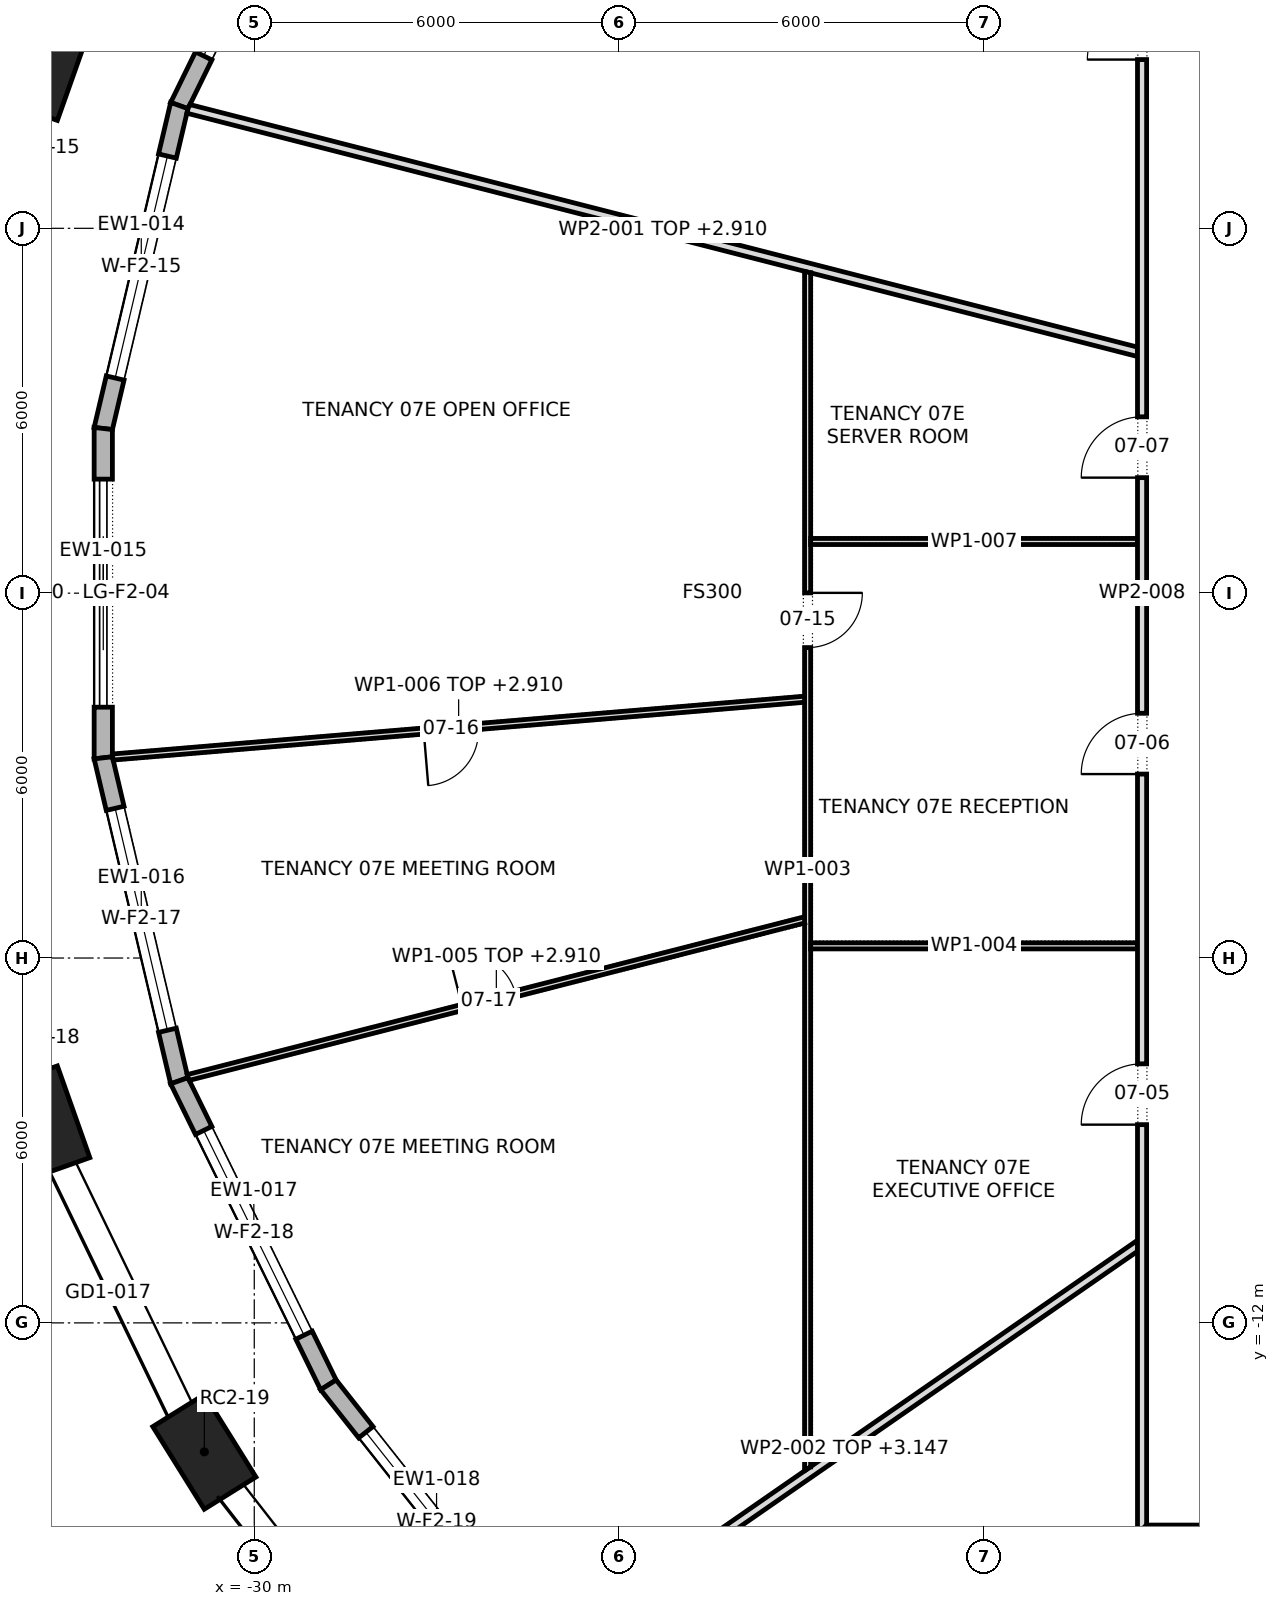
"""IFC4 building model, lengths in metres.
Left out: names, types, materials, properties, quantities, classifications, styles, units other than length and angle.
Written with IfcOpenShell. Run it as: python <this file> out.ifc"""

import sys

from ifc_helpers import new_model, si_unit, direction, frame, frame_2d, origin, origin_2d, place, context, subcontext, project, spatial, polyline, rectangle, outline, extrude, element, fill, save


model = new_model("IFC4")
c1 = context("Model", 3, precision=1e-05, world=origin(), true_north=direction((0.0, 1.0)))
c2 = subcontext(c1, "Body", "Model", "MODEL_VIEW")
j1 = project(units=[si_unit("LENGTHUNIT", "METRE"), si_unit("PLANEANGLEUNIT", "RADIAN")], contexts=[c1])
p1 = place(None, origin())
s1 = spatial("IfcSite", under=j1, at=p1, CompositionType="ELEMENT")
p2 = place(p1, origin())
s2 = spatial("IfcBuilding", under=s1, at=p2, CompositionType="ELEMENT")
p3 = place(p2, frame((0.0, 0.0, 112.9)))
s3 = spatial("IfcBuildingStorey", under=s2, at=p3, CompositionType="ELEMENT", Elevation=112.9)
for number, where, z_axis, x_axis in (
    (1, (-33.443, 8.695, 0.0), (0.0, 0.0, 1.0), (-0.334, -0.943, 0.0)),
    (2, (-33.443, -8.695, 0.0), (0.0, 0.0, 1.0), (0.334, -0.943, 0.0)),
    (3, (-30.821, -14.121, 0.0), (0.0, 0.0, 1.0), (0.529, -0.849, 0.0)),
):
    element("IfcColumn", number, at=place(p3, frame(where, z_axis=z_axis, x_axis=x_axis)), inside=s3, PredefinedType="COLUMN", context=c2, shape_type="SweptSolid", body=[
        extrude(rectangle(XDim=1.6, YDim=1.0, at=origin_2d()), origin(), (0.0, 0.0, 1.0), 4.2),
    ])
p4 = place(p3, frame((-28.781, 13.019, 0.0), z_axis=(0.0, 0.0, 1.0), x_axis=(-0.440238988749, -0.897880633929, 0.0)))
e4 = element("IfcWall", 4, at=p4, inside=s3, PredefinedType="STANDARD", context=c2, shape_type="SweptSolid", body=[
    extrude(outline(polyline([(-0.016, -0.15), (5.586, -0.15), (5.553, 0.15), (0.016, 0.15), (-0.016, -0.15)])), origin(), (0.0, 0.0, 1.0), 3.9),
])
p5 = place(p4, frame((0.91, 0.0, 0.6)))
e5 = element("IfcOpeningElement", 5, at=p5, cuts=e4, PredefinedType="OPENING", context=c2, shape_type="SweptSolid", body=[
    extrude(rectangle(XDim=3.75, YDim=2.85, at=frame_2d((1.875, 1.425))), frame((0.0, 0.162, 0.0), z_axis=(0.0, -1.0, 0.0), x_axis=(1.0, 0.0, 0.0)), (0.0, 0.0, 1.0), 0.324),
])
p6 = place(p3, frame((-31.233, 8.019, 0.0), z_axis=(0.0, 0.0, 1.0), x_axis=(-0.229193964616, -0.973380771632, 0.0)))
e6 = element("IfcWall", 6, at=p6, inside=s3, PredefinedType="STANDARD", context=c2, shape_type="SweptSolid", body=[
    extrude(outline(polyline([(-0.017, -0.15), (5.473, -0.15), (5.439, 0.15), (0.017, 0.15), (-0.017, -0.15)])), origin(), (0.0, 0.0, 1.0), 3.9),
])
p7 = place(p6, frame((0.853, 0.0, 0.6)))
e7 = element("IfcOpeningElement", 7, at=p7, cuts=e6, PredefinedType="OPENING", context=c2, shape_type="SweptSolid", body=[
    extrude(rectangle(XDim=3.75, YDim=2.85, at=frame_2d((1.875, 1.425))), frame((0.0, 0.162, 0.0), z_axis=(0.0, -1.0, 0.0), x_axis=(1.0, 0.0, 0.0)), (0.0, 0.0, 1.0), 0.324),
])
p8 = place(p3, frame((-32.483, 2.708, 0.0), z_axis=(0.0, 0.0, 1.0), x_axis=(0.0, -1.0, 0.0)))
e8 = element("IfcWall", 8, at=p8, inside=s3, PredefinedType="STANDARD", context=c2, shape_type="SweptSolid", body=[
    extrude(outline(polyline([(-0.017, -0.15), (5.433, -0.15), (5.398, 0.15), (0.017, 0.15), (-0.017, -0.15)])), origin(), (0.0, 0.0, 1.0), 3.9),
])
p9 = place(p8, frame((0.833, 0.0, 0.0)))
e9 = element("IfcOpeningElement", 9, at=p9, cuts=e8, PredefinedType="OPENING", context=c2, shape_type="SweptSolid", body=[
    extrude(rectangle(XDim=3.75, YDim=3.45, at=frame_2d((1.875, 1.725))), frame((0.0, 0.162, 0.0), z_axis=(0.0, -1.0, 0.0), x_axis=(1.0, 0.0, 0.0)), (0.0, 0.0, 1.0), 0.324),
])
p10 = place(p3, frame((-32.483, -2.708, 0.0), z_axis=(0.0, 0.0, 1.0), x_axis=(0.229193964616, -0.973380771632, 0.0)))
e10 = element("IfcWall", 10, at=p10, inside=s3, PredefinedType="STANDARD", context=c2, shape_type="SweptSolid", body=[
    extrude(outline(polyline([(-0.017, -0.15), (5.473, -0.15), (5.439, 0.15), (0.017, 0.15), (-0.017, -0.15)])), origin(), (0.0, 0.0, 1.0), 3.9),
])
p11 = place(p10, frame((0.853, 0.0, 0.6)))
e11 = element("IfcOpeningElement", 11, at=p11, cuts=e10, PredefinedType="OPENING", context=c2, shape_type="SweptSolid", body=[
    extrude(rectangle(XDim=3.75, YDim=2.85, at=frame_2d((1.875, 1.425))), frame((0.0, 0.162, 0.0), z_axis=(0.0, -1.0, 0.0), x_axis=(1.0, 0.0, 0.0)), (0.0, 0.0, 1.0), 0.324),
])
p12 = place(p3, frame((-31.233, -8.019, 0.0), z_axis=(0.0, 0.0, 1.0), x_axis=(0.440238988749, -0.897880633929, 0.0)))
e12 = element("IfcWall", 12, at=p12, inside=s3, PredefinedType="STANDARD", context=c2, shape_type="SweptSolid", body=[
    extrude(outline(polyline([(-0.017, -0.15), (5.586, -0.15), (5.553, 0.15), (0.017, 0.15), (-0.017, -0.15)])), origin(), (0.0, 0.0, 1.0), 3.9),
])
p13 = place(p12, frame((0.91, 0.0, 0.6)))
e13 = element("IfcOpeningElement", 13, at=p13, cuts=e12, PredefinedType="OPENING", context=c2, shape_type="SweptSolid", body=[
    extrude(rectangle(XDim=3.75, YDim=2.85, at=frame_2d((1.875, 1.425))), frame((0.0, 0.162, 0.0), z_axis=(0.0, -1.0, 0.0), x_axis=(1.0, 0.0, 0.0)), (0.0, 0.0, 1.0), 0.324),
])
p14 = place(p3, frame((-28.781, -13.019, 0.0), z_axis=(0.0, 0.0, 1.0), x_axis=(0.620329992039, -0.784340934146, 0.0)))
e14 = element("IfcWall", 14, at=p14, inside=s3, PredefinedType="STANDARD", context=c2, shape_type="SweptSolid", body=[
    extrude(outline(polyline([(-0.016, -0.15), (5.75, -0.15), (5.72, 0.15), (0.016, 0.15), (-0.016, -0.15)])), origin(), (0.0, 0.0, 1.0), 3.9),
])
p15 = place(p14, frame((0.993, 0.0, 0.6)))
e15 = element("IfcOpeningElement", 15, at=p15, cuts=e14, PredefinedType="OPENING", context=c2, shape_type="SweptSolid", body=[
    extrude(rectangle(XDim=3.75, YDim=2.85, at=frame_2d((1.875, 1.425))), frame((0.0, 0.162, 0.0), z_axis=(0.0, -1.0, 0.0), x_axis=(1.0, 0.0, 0.0)), (0.0, 0.0, 1.0), 0.324),
])
p16 = place(p3, frame((-31.09, 7.966, 0.0), z_axis=(0.0, 0.0, 1.0), x_axis=(0.968771016809, -0.247957086995, 0.0)))
e16 = element("IfcWall", 16, at=p16, inside=s3, PredefinedType="PARTITIONING", context=c2, shape_type="SweptSolid", body=[
    extrude(outline(polyline([(16.137, -0.075), (16.137, -0.073), (16.099, 0.075), (14.312, 0.075), (12.524, 0.075), (10.737, 0.075), (8.95, 0.075), (7.163, 0.075), (5.375, 0.075), (3.588, 0.075), (1.801, 0.075), (0.014, 0.075), (0.0, 0.008), (0.0, -0.067), (0.0, -0.075), (1.793, -0.075), (3.586, -0.075), (5.379, -0.075), (7.172, -0.075), (8.965, -0.075), (10.758, -0.075), (12.551, -0.075), (14.344, -0.075), (16.137, -0.075)])), origin(), (0.0, 0.0, 1.0), 2.91),
])
p17 = place(p3, frame((-25.12, -17.414, 0.0), z_axis=(0.0, 0.0, 1.0), x_axis=(0.822008683907, 0.569474954306, 0.0)))
e17 = element("IfcWall", 17, at=p17, inside=s3, PredefinedType="PARTITIONING", context=c2, shape_type="SweptSolid", body=[
    extrude(outline(polyline([(0.024, -0.075), (1.967, -0.075), (3.91, -0.075), (5.853, -0.075), (7.796, -0.075), (9.739, -0.075), (11.681, -0.075), (11.734, 0.002), (11.734, 0.002), (11.785, 0.074), (11.785, 0.075), (10.15, 0.075), (8.516, 0.075), (6.881, 0.075), (5.246, 0.075), (5.245, 0.072), (5.241, 0.075), (3.494, 0.075), (1.747, 0.075), (0.0, 0.075), (0.0, 0.07), (0.005, -0.002), (0.024, -0.075)])), origin(), (0.0, 0.0, 1.0), 3.147),
])
p18 = place(p3, frame((-20.9, -14.434, 0.0), z_axis=(0.0, 0.0, 1.0), x_axis=(0.0, 1.0, 0.0)))
e18 = element("IfcWall", 18, at=p18, inside=s3, PredefinedType="PARTITIONING", context=c2, shape_type="SweptSolid", body=[
    extrude(outline(polyline([(0.069, -0.05), (1.772, -0.05), (3.475, -0.05), (5.178, -0.05), (6.881, -0.05), (8.583, -0.05), (8.583, -0.05), (8.684, -0.05), (8.684, -0.05), (10.321, -0.05), (11.958, -0.05), (13.596, -0.05), (15.234, -0.05), (15.234, -0.05), (15.333, -0.05), (15.333, -0.05), (16.789, -0.05), (18.245, -0.05), (19.701, -0.05), (19.727, 0.05), (19.727, 0.05), (17.942, 0.05), (16.156, 0.05), (14.372, 0.05), (12.587, 0.05), (10.802, 0.05), (9.017, 0.05), (9.01, 0.048), (9.009, 0.05), (7.208, 0.05), (5.406, 0.05), (3.604, 0.05), (1.802, 0.05), (0.0, 0.05), (0.069, -0.05)])), origin(), (0.0, 0.0, 1.0), 3.9),
])
p19 = place(p18, frame((13.539, 0.0, 0.0)))
e19 = element("IfcOpeningElement", 19, at=p19, cuts=e18, PredefinedType="OPENING", context=c2, shape_type="SweptSolid", body=[
    extrude(rectangle(XDim=0.9, YDim=2.1, at=frame_2d((0.45, 1.05))), frame((0.0, 0.062, 0.0), z_axis=(0.0, -1.0, 0.0), x_axis=(1.0, 0.0, 0.0)), (0.0, 0.0, 1.0), 0.124),
])
p20 = place(p3, frame((-20.85, -5.8, 0.0), z_axis=(0.0, 0.0, 1.0), x_axis=(1.0, 0.0, 0.0)))
e20 = element("IfcWall", 20, at=p20, inside=s3, PredefinedType="PARTITIONING", context=c2, shape_type="SweptSolid", body=[
    extrude(rectangle(XDim=5.375, YDim=0.1, at=frame_2d((2.688, 0.0))), origin(), (0.0, 0.0, 1.0), 3.9),
])
p21 = place(p3, frame((-20.938, -5.37, 0.0), z_axis=(0.0, 0.0, 1.0), x_axis=(-0.968822345516, -0.247756458702, 0.0)))
e21 = element("IfcWall", 21, at=p21, inside=s3, PredefinedType="PARTITIONING", context=c2, shape_type="SweptSolid", body=[
    extrude(outline(polyline([(10.479, -0.05), (10.479, 0.007), (10.47, 0.05), (8.729, 0.05), (6.988, 0.05), (5.248, 0.05), (3.507, 0.05), (1.766, 0.05), (0.025, 0.05), (0.0, -0.05), (0.0, -0.05), (1.747, -0.05), (3.493, -0.05), (5.239, -0.05), (6.986, -0.05), (8.732, -0.05), (10.479, -0.05)])), origin(), (0.0, 0.0, 1.0), 2.91),
])
p22 = place(p21, frame((4.92, 0.0, 0.0)))
e22 = element("IfcOpeningElement", 22, at=p22, cuts=e21, PredefinedType="OPENING", context=c2, shape_type="SweptSolid", body=[
    extrude(rectangle(XDim=0.9, YDim=2.1, at=frame_2d((0.45, 1.05))), frame((0.0, 0.062, 0.0), z_axis=(0.0, -1.0, 0.0), x_axis=(1.0, 0.0, 0.0)), (0.0, 0.0, 1.0), 0.124),
])
p23 = place(p3, frame((-20.946, -1.744, 0.0), z_axis=(0.0, 0.0, 1.0), x_axis=(-0.996528638139, -0.083250665871, 0.0)))
e23 = element("IfcWall", 23, at=p23, inside=s3, PredefinedType="PARTITIONING", context=c2, shape_type="SweptSolid", body=[
    extrude(outline(polyline([(11.422, -0.05), (11.422, 0.023), (11.418, 0.05), (9.517, 0.05), (7.615, 0.05), (5.713, 0.05), (3.812, 0.05), (1.91, 0.05), (0.008, 0.05), (0.0, -0.05), (1.904, -0.05), (3.807, -0.05), (5.711, -0.05), (7.615, -0.05), (9.519, -0.05), (11.422, -0.05)])), origin(), (0.0, 0.0, 1.0), 2.91),
])
p24 = place(p23, frame((5.389, 0.0, 0.0)))
e24 = element("IfcOpeningElement", 24, at=p24, cuts=e23, PredefinedType="OPENING", context=c2, shape_type="SweptSolid", body=[
    extrude(rectangle(XDim=0.9, YDim=2.1, at=frame_2d((0.45, 1.05))), frame((0.0, 0.062, 0.0), z_axis=(0.0, -1.0, 0.0), x_axis=(1.0, 0.0, 0.0)), (0.0, 0.0, 1.0), 0.124),
])
p25 = place(p3, frame((-20.85, 0.85, 0.0), z_axis=(0.0, 0.0, 1.0), x_axis=(1.0, 0.0, 0.0)))
e25 = element("IfcWall", 25, at=p25, inside=s3, PredefinedType="PARTITIONING", context=c2, shape_type="SweptSolid", body=[
    extrude(rectangle(XDim=5.375, YDim=0.1, at=frame_2d((2.688, 0.0))), origin(), (0.0, 0.0, 1.0), 3.9),
])
p26 = place(p3, frame((-15.4, -15.475, 0.0), z_axis=(0.0, 0.0, 1.0), x_axis=(0.0, 1.0, 0.0)))
e26 = element("IfcWall", 26, at=p26, inside=s3, PredefinedType="PARTITIONING", context=c2, shape_type="SweptSolid", body=[
    extrude(outline(polyline([(0.15, -0.075), (2.066, -0.075), (3.981, -0.075), (5.897, -0.075), (7.812, -0.075), (9.728, -0.075), (11.644, -0.075), (13.56, -0.075), (15.475, -0.075), (17.391, -0.075), (19.306, -0.075), (21.222, -0.075), (23.138, -0.075), (25.053, -0.075), (26.969, -0.075), (28.885, -0.075), (30.8, -0.075), (30.95, 0.075), (29.016, 0.075), (27.081, 0.075), (25.147, 0.075), (23.212, 0.075), (21.278, 0.075), (19.344, 0.075), (17.409, 0.075), (15.475, 0.075), (13.541, 0.075), (11.606, 0.075), (9.672, 0.075), (7.738, 0.075), (5.803, 0.075), (3.869, 0.075), (1.935, 0.075), (0.0, 0.075), (0.15, -0.075)])), origin(), (0.0, 0.0, 1.0), 3.9),
])
p27 = place(p26, frame((24.25, 0.0, 0.0)))
e27 = element("IfcOpeningElement", 27, at=p27, cuts=e26, PredefinedType="OPENING", context=c2, shape_type="SweptSolid", body=[
    extrude(rectangle(XDim=1.8, YDim=2.1, at=frame_2d((0.9, 1.05))), frame((0.0, 0.087, 0.0), z_axis=(0.0, -1.0, 0.0), x_axis=(1.0, 0.0, 0.0)), (0.0, 0.0, 1.0), 0.174),
])
p28 = place(p26, frame((6.735, 0.0, 0.0)))
e28 = element("IfcOpeningElement", 28, at=p28, cuts=e26, PredefinedType="OPENING", context=c2, shape_type="SweptSolid", body=[
    extrude(rectangle(XDim=1.0, YDim=2.1, at=frame_2d((0.5, 1.05))), frame((0.0, 0.087, 0.0), z_axis=(0.0, -1.0, 0.0), x_axis=(1.0, 0.0, 0.0)), (0.0, 0.0, 1.0), 0.174),
])
p29 = place(p26, frame((12.5, 0.0, 0.0)))
e29 = element("IfcOpeningElement", 29, at=p29, cuts=e26, PredefinedType="OPENING", context=c2, shape_type="SweptSolid", body=[
    extrude(rectangle(XDim=1.0, YDim=2.1, at=frame_2d((0.5, 1.05))), frame((0.0, 0.087, 0.0), z_axis=(0.0, -1.0, 0.0), x_axis=(1.0, 0.0, 0.0)), (0.0, 0.0, 1.0), 0.174),
])
p30 = place(p26, frame((17.375, 0.0, 0.0)))
e30 = element("IfcOpeningElement", 30, at=p30, cuts=e26, PredefinedType="OPENING", context=c2, shape_type="SweptSolid", body=[
    extrude(rectangle(XDim=1.0, YDim=2.1, at=frame_2d((0.5, 1.05))), frame((0.0, 0.087, 0.0), z_axis=(0.0, -1.0, 0.0), x_axis=(1.0, 0.0, 0.0)), (0.0, 0.0, 1.0), 0.174),
])
p31 = place(p3, frame((-15.475, -15.4, 0.0), z_axis=(0.0, 0.0, 1.0), x_axis=(1.0, 0.0, 0.0)))
e31 = element("IfcWall", 31, at=p31, inside=s3, PredefinedType="PARTITIONING", context=c2, shape_type="SweptSolid", body=[
    extrude(outline(polyline([(0.0, -0.075), (1.935, -0.075), (3.869, -0.075), (5.803, -0.075), (7.738, -0.075), (9.672, -0.075), (11.606, -0.075), (13.541, -0.075), (15.475, -0.075), (17.409, -0.075), (19.344, -0.075), (21.278, -0.075), (23.212, -0.075), (25.147, -0.075), (27.081, -0.075), (29.016, -0.075), (30.95, -0.075), (30.8, 0.075), (28.885, 0.075), (26.969, 0.075), (25.053, 0.075), (23.138, 0.075), (21.222, 0.075), (19.306, 0.075), (17.391, 0.075), (15.475, 0.075), (13.56, 0.075), (11.644, 0.075), (9.728, 0.075), (7.812, 0.075), (5.897, 0.075), (3.981, 0.075), (2.066, 0.075), (0.15, 0.075), (0.0, -0.075)])), origin(), (0.0, 0.0, 1.0), 3.9),
])
p32 = place(p31, frame((2.405, 0.0, 0.0)))
e32 = element("IfcOpeningElement", 32, at=p32, cuts=e31, PredefinedType="OPENING", context=c2, shape_type="SweptSolid", body=[
    extrude(rectangle(XDim=1.0, YDim=2.1, at=frame_2d((0.5, 1.05))), frame((0.0, 0.087, 0.0), z_axis=(0.0, -1.0, 0.0), x_axis=(1.0, 0.0, 0.0)), (0.0, 0.0, 1.0), 0.174),
])
p33 = place(p31, frame((10.605, 0.0, 0.0)))
e33 = element("IfcOpeningElement", 33, at=p33, cuts=e31, PredefinedType="OPENING", context=c2, shape_type="SweptSolid", body=[
    extrude(rectangle(XDim=1.8, YDim=2.1, at=frame_2d((0.9, 1.05))), frame((0.0, 0.087, 0.0), z_axis=(0.0, -1.0, 0.0), x_axis=(1.0, 0.0, 0.0)), (0.0, 0.0, 1.0), 0.174),
])
p34 = place(p31, frame((22.955, 0.0, 0.0)))
e34 = element("IfcOpeningElement", 34, at=p34, cuts=e31, PredefinedType="OPENING", context=c2, shape_type="SweptSolid", body=[
    extrude(rectangle(XDim=1.8, YDim=2.1, at=frame_2d((0.9, 1.05))), frame((0.0, 0.087, 0.0), z_axis=(0.0, -1.0, 0.0), x_axis=(1.0, 0.0, 0.0)), (0.0, 0.0, 1.0), 0.174),
])
p35 = place(p5, origin())
e35 = element("IfcWindow", 35, at=p35, inside=s3, PartitioningType="TRIPLE_PANEL_VERTICAL", PredefinedType="WINDOW", context=c2, shape_type="SweptSolid", body=[
    extrude(rectangle(XDim=3.75, YDim=2.85, at=frame_2d((1.875, 1.425))), frame((0.0, 0.03, 0.0), z_axis=(0.0, -1.0, 0.0), x_axis=(1.0, 0.0, 0.0)), (0.0, 0.0, 1.0), 0.06),
])
fill(e5, e35)
p36 = place(p7, origin())
e36 = element("IfcWindow", 36, at=p36, inside=s3, PartitioningType="TRIPLE_PANEL_VERTICAL", PredefinedType="WINDOW", context=c2, shape_type="SweptSolid", body=[
    extrude(rectangle(XDim=3.75, YDim=2.85, at=frame_2d((1.875, 1.425))), frame((0.0, 0.03, 0.0), z_axis=(0.0, -1.0, 0.0), x_axis=(1.0, 0.0, 0.0)), (0.0, 0.0, 1.0), 0.06),
])
fill(e7, e36)
p37 = place(p9, origin())
e37 = element("IfcDoor", 37, at=p37, inside=s3, OperationType="DOUBLE_DOOR_SLIDING", PredefinedType="DOOR", context=c2, shape_type="SweptSolid", body=[
    extrude(rectangle(XDim=3.75, YDim=3.45, at=frame_2d((1.875, 1.725))), frame((0.0, 0.025, 0.0), z_axis=(0.0, -1.0, 0.0), x_axis=(1.0, 0.0, 0.0)), (0.0, 0.0, 1.0), 0.05),
])
fill(e9, e37)
p38 = place(p11, origin())
e38 = element("IfcWindow", 38, at=p38, inside=s3, PartitioningType="TRIPLE_PANEL_VERTICAL", PredefinedType="WINDOW", context=c2, shape_type="SweptSolid", body=[
    extrude(rectangle(XDim=3.75, YDim=2.85, at=frame_2d((1.875, 1.425))), frame((0.0, 0.03, 0.0), z_axis=(0.0, -1.0, 0.0), x_axis=(1.0, 0.0, 0.0)), (0.0, 0.0, 1.0), 0.06),
])
fill(e11, e38)
p39 = place(p13, origin())
e39 = element("IfcWindow", 39, at=p39, inside=s3, PartitioningType="TRIPLE_PANEL_VERTICAL", PredefinedType="WINDOW", context=c2, shape_type="SweptSolid", body=[
    extrude(rectangle(XDim=3.75, YDim=2.85, at=frame_2d((1.875, 1.425))), frame((0.0, 0.03, 0.0), z_axis=(0.0, -1.0, 0.0), x_axis=(1.0, 0.0, 0.0)), (0.0, 0.0, 1.0), 0.06),
])
fill(e13, e39)
p40 = place(p15, origin())
e40 = element("IfcWindow", 40, at=p40, inside=s3, PartitioningType="TRIPLE_PANEL_VERTICAL", PredefinedType="WINDOW", context=c2, shape_type="SweptSolid", body=[
    extrude(rectangle(XDim=3.75, YDim=2.85, at=frame_2d((1.875, 1.425))), frame((0.0, 0.03, 0.0), z_axis=(0.0, -1.0, 0.0), x_axis=(1.0, 0.0, 0.0)), (0.0, 0.0, 1.0), 0.06),
])
fill(e15, e40)
p41 = place(p27, origin())
e41 = element("IfcDoor", 41, at=p41, inside=s3, OperationType="DOUBLE_DOOR_SINGLE_SWING", PredefinedType="DOOR", context=c2, shape_type="SweptSolid", body=[
    extrude(rectangle(XDim=1.8, YDim=2.1, at=frame_2d((0.9, 1.05))), frame((0.0, 0.025, 0.0), z_axis=(0.0, -1.0, 0.0), x_axis=(1.0, 0.0, 0.0)), (0.0, 0.0, 1.0), 0.05),
])
fill(e27, e41)
p42 = place(p28, origin())
e42 = element("IfcDoor", 42, at=p42, inside=s3, OperationType="SINGLE_SWING_RIGHT", PredefinedType="DOOR", context=c2, shape_type="SweptSolid", body=[
    extrude(rectangle(XDim=1.0, YDim=2.1, at=frame_2d((0.5, 1.05))), frame((0.0, 0.025, 0.0), z_axis=(0.0, -1.0, 0.0), x_axis=(1.0, 0.0, 0.0)), (0.0, 0.0, 1.0), 0.05),
])
fill(e28, e42)
p43 = place(p29, origin())
e43 = element("IfcDoor", 43, at=p43, inside=s3, OperationType="SINGLE_SWING_RIGHT", PredefinedType="DOOR", context=c2, shape_type="SweptSolid", body=[
    extrude(rectangle(XDim=1.0, YDim=2.1, at=frame_2d((0.5, 1.05))), frame((0.0, 0.025, 0.0), z_axis=(0.0, -1.0, 0.0), x_axis=(1.0, 0.0, 0.0)), (0.0, 0.0, 1.0), 0.05),
])
fill(e29, e43)
p44 = place(p30, origin())
e44 = element("IfcDoor", 44, at=p44, inside=s3, OperationType="SINGLE_SWING_RIGHT", PredefinedType="DOOR", context=c2, shape_type="SweptSolid", body=[
    extrude(rectangle(XDim=1.0, YDim=2.1, at=frame_2d((0.5, 1.05))), frame((0.0, 0.025, 0.0), z_axis=(0.0, -1.0, 0.0), x_axis=(1.0, 0.0, 0.0)), (0.0, 0.0, 1.0), 0.05),
])
fill(e30, e44)
p45 = place(p19, frame((0.9, 0.0, 0.0), z_axis=(0.0, 0.0, 1.0), x_axis=(-1.0, 0.0, 0.0)))
e45 = element("IfcDoor", 45, at=p45, inside=s3, OperationType="SINGLE_SWING_RIGHT", PredefinedType="DOOR", context=c2, shape_type="SweptSolid", body=[
    extrude(rectangle(XDim=0.9, YDim=2.1, at=frame_2d((0.45, 1.05))), frame((0.0, 0.025, 0.0), z_axis=(0.0, -1.0, 0.0), x_axis=(1.0, 0.0, 0.0)), (0.0, 0.0, 1.0), 0.05),
])
fill(e19, e45)
p46 = place(p24, origin())
e46 = element("IfcDoor", 46, at=p46, inside=s3, OperationType="SINGLE_SWING_LEFT", PredefinedType="DOOR", context=c2, shape_type="SweptSolid", body=[
    extrude(rectangle(XDim=0.9, YDim=2.1, at=frame_2d((0.45, 1.05))), frame((0.0, 0.025, 0.0), z_axis=(0.0, -1.0, 0.0), x_axis=(1.0, 0.0, 0.0)), (0.0, 0.0, 1.0), 0.05),
])
fill(e24, e46)
p47 = place(p22, frame((0.9, 0.0, 0.0), z_axis=(0.0, 0.0, 1.0), x_axis=(-1.0, 0.0, 0.0)))
e47 = element("IfcDoor", 47, at=p47, inside=s3, OperationType="SINGLE_SWING_RIGHT", PredefinedType="DOOR", context=c2, shape_type="SweptSolid", body=[
    extrude(rectangle(XDim=0.9, YDim=2.1, at=frame_2d((0.45, 1.05))), frame((0.0, 0.025, 0.0), z_axis=(0.0, -1.0, 0.0), x_axis=(1.0, 0.0, 0.0)), (0.0, 0.0, 1.0), 0.05),
])
fill(e22, e47)
save(model, sys.argv[1])
